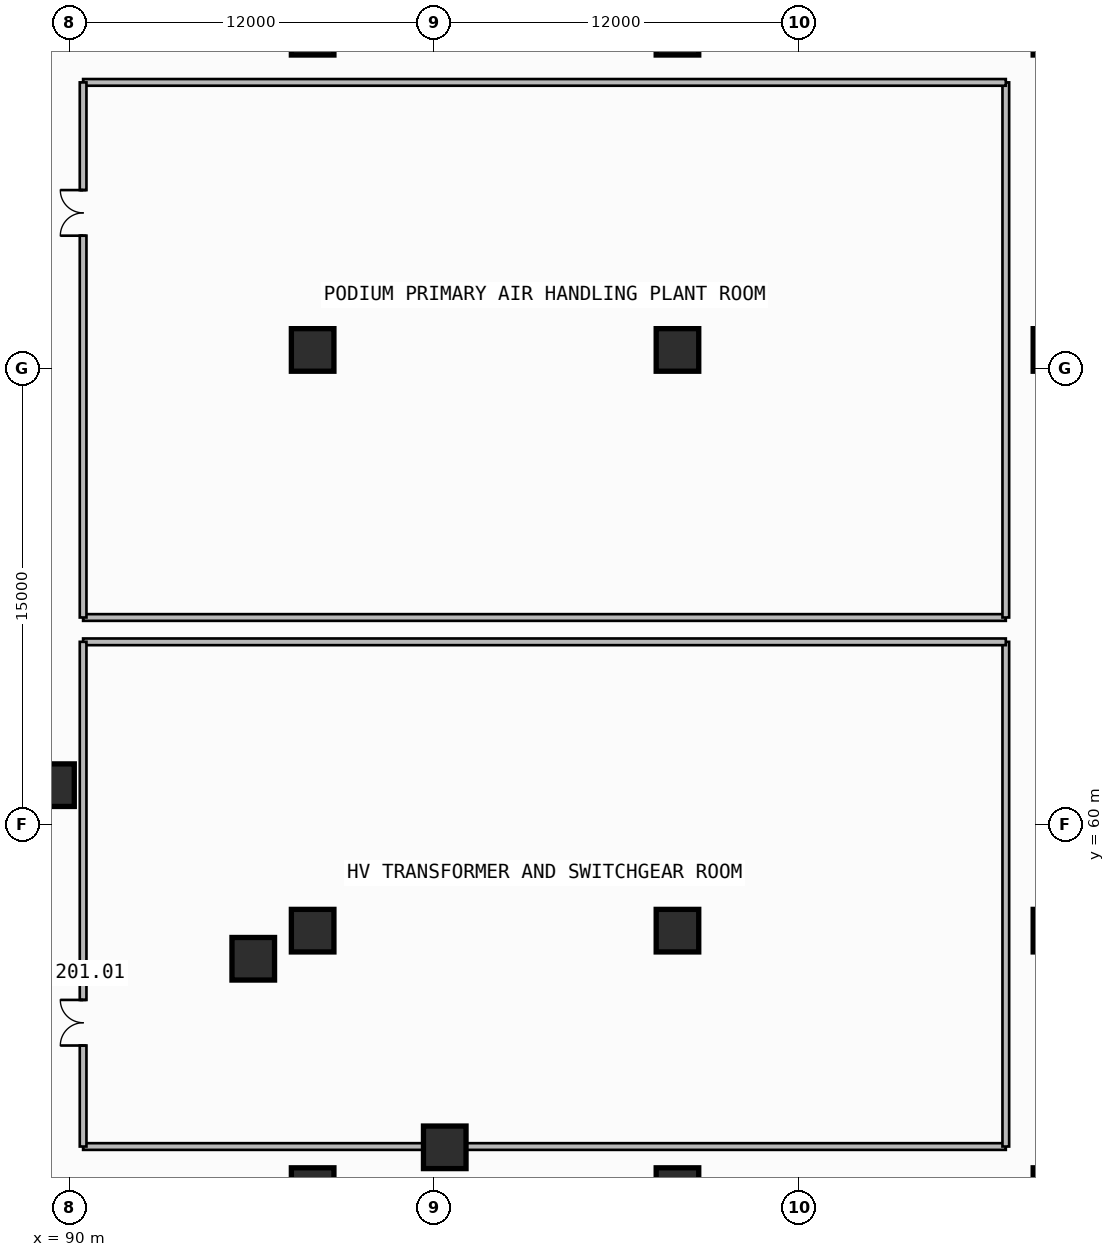
"""IFC4 building model, lengths in metres.
Left out: names, types, materials, properties, quantities, classifications, styles, units other than length and angle.
Written with IfcOpenShell. Run it as: python <this file> out.ifc"""

import sys

from ifc_helpers import new_model, si_unit, direction, frame, frame_2d, origin, origin_2d, place, context, subcontext, project, spatial, rectangle, extrude, element, fill, save


model = new_model("IFC4")
c1 = context("Model", 3, precision=1e-05, world=origin(), true_north=direction((0.0, 1.0)))
c2 = subcontext(c1, "Body", "Model", "MODEL_VIEW")
j1 = project(units=[si_unit("LENGTHUNIT", "METRE"), si_unit("PLANEANGLEUNIT", "RADIAN")], contexts=[c1])
p1 = place(None, origin())
s1 = spatial("IfcSite", under=j1, at=p1, CompositionType="ELEMENT")
p2 = place(p1, origin())
s2 = spatial("IfcBuilding", under=s1, at=p2, CompositionType="ELEMENT")
p3 = place(p2, frame((0.0, 0.0, -6.0)))
s3 = spatial("IfcBuildingStorey", under=s2, at=p3, CompositionType="ELEMENT", Elevation=-6.0)
for number, where, z_axis, x_axis in (
    (1, (98.0, 48.0, -0.6), (0.0, 0.0, 1.0), (1.0, 0.0, 0.0)),
    (2, (98.0, 56.5, -0.6), (0.0, 0.0, 1.0), (1.0, 0.0, 0.0)),
    (3, (98.0, 75.6, -0.6), (0.0, 0.0, 1.0), (1.0, 0.0, 0.0)),
    (4, (98.0, 86.0, -0.6), (0.0, 0.0, 1.0), (1.0, 0.0, 0.0)),
    (5, (110.0, 48.0, -0.6), (0.0, 0.0, 1.0), (1.0, 0.0, 0.0)),
    (6, (110.0, 56.5, -0.6), (0.0, 0.0, 1.0), (1.0, 0.0, 0.0)),
    (7, (110.0, 75.6, -0.6), (0.0, 0.0, 1.0), (1.0, 0.0, 0.0)),
    (8, (110.0, 86.0, -0.6), (0.0, 0.0, 1.0), (1.0, 0.0, 0.0)),
    (9, (122.4, 48.0, -0.6), (0.0, 0.0, 1.0), (1.0, 0.0, 0.0)),
    (10, (122.4, 56.5, -0.6), (0.0, 0.0, 1.0), (1.0, 0.0, 0.0)),
    (11, (122.4, 75.6, -0.6), (0.0, 0.0, 1.0), (1.0, 0.0, 0.0)),
    (12, (122.4, 86.0, -0.6), (0.0, 0.0, 1.0), (1.0, 0.0, 0.0)),
    (13, (102.345, 49.374, -0.6), (0.0, 0.0, 1.0), (1.0, 0.0, 0.0)),
    (14, (96.047, 55.576, -0.6), (0.0, 0.0, 1.0), (1.0, 0.0, 0.0)),
    (15, (89.46, 61.285, -0.6), (0.0, 0.0, 1.0), (1.0, 0.0, 0.0)),
):
    element("IfcColumn", number, at=place(p3, frame(where, z_axis=z_axis, x_axis=x_axis)), inside=s3, PredefinedType="COLUMN", context=c2, shape_type="SweptSolid", body=[
        extrude(rectangle(XDim=1.4, YDim=1.4, at=origin_2d()), origin(), (0.0, 0.0, 1.0), 6.6),
    ])
p4 = place(p3, frame((90.45, 49.4, 0.0), z_axis=(0.0, 0.0, 1.0), x_axis=(1.0, 0.0, 0.0)))
e16 = element("IfcWall", 16, at=p4, inside=s3, PredefinedType="SOLIDWALL", context=c2, shape_type="SweptSolid", body=[
    extrude(rectangle(XDim=30.35, YDim=0.22, at=frame_2d((15.175, 0.0))), origin(), (0.0, 0.0, 1.0), 4.885),
])
p5 = place(p3, frame((120.8, 49.4, 0.0), z_axis=(0.0, 0.0, 1.0), x_axis=(0.0, 1.0, 0.0)))
e17 = element("IfcWall", 17, at=p5, inside=s3, PredefinedType="SOLIDWALL", context=c2, shape_type="SweptSolid", body=[
    extrude(rectangle(XDim=16.6, YDim=0.22, at=frame_2d((8.3, 0.0))), origin(), (0.0, 0.0, 1.0), 4.885),
])
p6 = place(p3, frame((120.8, 66.0, 0.0), z_axis=(0.0, 0.0, 1.0), x_axis=(-1.0, 0.0, 0.0)))
e18 = element("IfcWall", 18, at=p6, inside=s3, PredefinedType="SOLIDWALL", context=c2, shape_type="SweptSolid", body=[
    extrude(rectangle(XDim=30.35, YDim=0.22, at=frame_2d((15.175, 0.0))), origin(), (0.0, 0.0, 1.0), 4.885),
])
p7 = place(p3, frame((90.45, 66.0, 0.0), z_axis=(0.0, 0.0, 1.0), x_axis=(0.0, -1.0, 0.0)))
e19 = element("IfcWall", 19, at=p7, inside=s3, PredefinedType="SOLIDWALL", context=c2, shape_type="SweptSolid", body=[
    extrude(rectangle(XDim=16.6, YDim=0.22, at=frame_2d((8.3, 0.0))), origin(), (0.0, 0.0, 1.0), 4.885),
])
p8 = place(p7, frame((11.778, 0.0, 0.0)))
e20 = element("IfcOpeningElement", 20, at=p8, cuts=e19, PredefinedType="OPENING", context=c2, shape_type="SweptSolid", body=[
    extrude(rectangle(XDim=1.5, YDim=2.25, at=frame_2d((0.75, 1.125))), frame((0.0, 0.12, 0.0), z_axis=(0.0, -1.0, 0.0), x_axis=(1.0, 0.0, 0.0)), (0.0, 0.0, 1.0), 0.24),
])
p9 = place(p3, frame((90.45, 66.8, 0.0), z_axis=(0.0, 0.0, 1.0), x_axis=(1.0, 0.0, 0.0)))
e21 = element("IfcWall", 21, at=p9, inside=s3, PredefinedType="SOLIDWALL", context=c2, shape_type="SweptSolid", body=[
    extrude(rectangle(XDim=30.35, YDim=0.22, at=frame_2d((15.175, 0.0))), origin(), (0.0, 0.0, 1.0), 4.885),
])
p10 = place(p3, frame((120.8, 66.8, 0.0), z_axis=(0.0, 0.0, 1.0), x_axis=(0.0, 1.0, 0.0)))
e22 = element("IfcWall", 22, at=p10, inside=s3, PredefinedType="SOLIDWALL", context=c2, shape_type="SweptSolid", body=[
    extrude(rectangle(XDim=17.6, YDim=0.22, at=frame_2d((8.8, 0.0))), origin(), (0.0, 0.0, 1.0), 4.885),
])
p11 = place(p3, frame((120.8, 84.4, 0.0), z_axis=(0.0, 0.0, 1.0), x_axis=(-1.0, 0.0, 0.0)))
e23 = element("IfcWall", 23, at=p11, inside=s3, PredefinedType="SOLIDWALL", context=c2, shape_type="SweptSolid", body=[
    extrude(rectangle(XDim=30.35, YDim=0.22, at=frame_2d((15.175, 0.0))), origin(), (0.0, 0.0, 1.0), 4.885),
])
p12 = place(p3, frame((90.45, 84.4, 0.0), z_axis=(0.0, 0.0, 1.0), x_axis=(0.0, -1.0, 0.0)))
e24 = element("IfcWall", 24, at=p12, inside=s3, PredefinedType="SOLIDWALL", context=c2, shape_type="SweptSolid", body=[
    extrude(rectangle(XDim=17.6, YDim=0.22, at=frame_2d((8.8, 0.0))), origin(), (0.0, 0.0, 1.0), 4.885),
])
p13 = place(p12, frame((3.542, 0.0, 0.0)))
e25 = element("IfcOpeningElement", 25, at=p13, cuts=e24, PredefinedType="OPENING", context=c2, shape_type="SweptSolid", body=[
    extrude(rectangle(XDim=1.5, YDim=2.25, at=frame_2d((0.75, 1.125))), frame((0.0, 0.12, 0.0), z_axis=(0.0, -1.0, 0.0), x_axis=(1.0, 0.0, 0.0)), (0.0, 0.0, 1.0), 0.24),
])
p14 = place(p8, frame((1.5, 0.0, 0.0), z_axis=(0.0, 0.0, 1.0), x_axis=(-1.0, 0.0, 0.0)))
e26 = element("IfcDoor", 26, at=p14, inside=s3, OperationType="DOUBLE_DOOR_SINGLE_SWING", PredefinedType="DOOR", context=c2, shape_type="SweptSolid", body=[
    extrude(rectangle(XDim=1.5, YDim=2.25, at=frame_2d((0.75, 1.125))), frame((0.0, 0.025, 0.0), z_axis=(0.0, -1.0, 0.0), x_axis=(1.0, 0.0, 0.0)), (0.0, 0.0, 1.0), 0.05),
])
fill(e20, e26)
p15 = place(p13, frame((1.5, 0.0, 0.0), z_axis=(0.0, 0.0, 1.0), x_axis=(-1.0, 0.0, 0.0)))
e27 = element("IfcDoor", 27, at=p15, inside=s3, OperationType="DOUBLE_DOOR_SINGLE_SWING", PredefinedType="DOOR", context=c2, shape_type="SweptSolid", body=[
    extrude(rectangle(XDim=1.5, YDim=2.25, at=frame_2d((0.75, 1.125))), frame((0.0, 0.025, 0.0), z_axis=(0.0, -1.0, 0.0), x_axis=(1.0, 0.0, 0.0)), (0.0, 0.0, 1.0), 0.05),
])
fill(e25, e27)
save(model, sys.argv[1])
